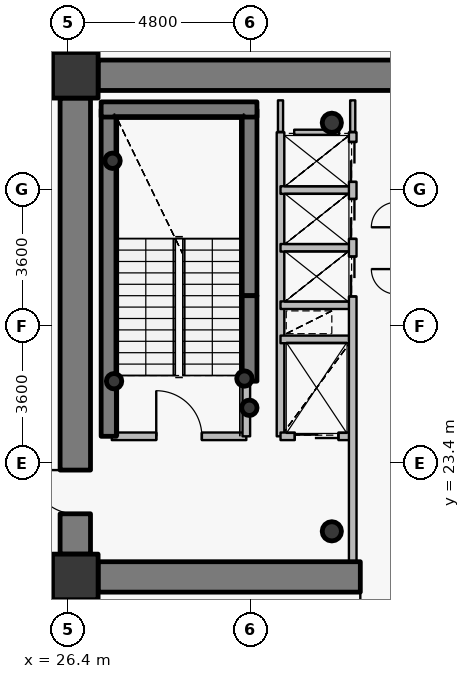
"""IFC4 building model, lengths in metres.
Left out: names, types, materials, properties, quantities, classifications, styles, units other than length and angle.
Written with IfcOpenShell. Run it as: python <this file> out.ifc"""

import sys

from ifc_helpers import new_model, si_unit, direction, frame, frame_2d, origin, origin_2d, place, context, subcontext, project, spatial, rectangle, hollow_circle, extrude, source, transform, mapped, element, fill, save


model = new_model("IFC4")
c1 = context("Model", 3, precision=1e-05, world=origin(), true_north=direction((0.0, 1.0)))
c2 = subcontext(c1, "Body", "Model", "MODEL_VIEW")
j1 = project(units=[si_unit("LENGTHUNIT", "METRE"), si_unit("PLANEANGLEUNIT", "RADIAN")], contexts=[c1])
p1 = place(None, origin())
s1 = spatial("IfcSite", under=j1, at=p1, CompositionType="ELEMENT")
p2 = place(p1, origin())
s2 = spatial("IfcBuilding", under=s1, at=p2, CompositionType="ELEMENT")
p3 = place(p2, frame((0.0, 0.0, 189.9)))
s3 = spatial("IfcBuildingStorey", under=s2, at=p3, CompositionType="ELEMENT", Elevation=189.9)
for number, where, z_axis, x_axis in (
    (1, (26.6, 20.4, 0.0), (0.0, 0.0, 1.0), (1.0, 0.0, 0.0)),
    (2, (26.6, 33.6, 0.0), (0.0, 0.0, 1.0), (1.0, 0.0, 0.0)),
):
    element("IfcColumn", number, at=place(p3, frame(where, z_axis=z_axis, x_axis=x_axis)), inside=s3, PredefinedType="COLUMN", context=c2, shape_type="SweptSolid", body=[
        extrude(rectangle(XDim=1.2, YDim=1.2, at=origin_2d()), origin(), (0.0, 0.0, 1.0), 3.75),
    ])
for number, where, z_axis, x_axis in (
    (3, (33.35, 21.6, 0.0), (0.0, 0.0, 1.0), (1.0, 0.0, 0.0)),
    (4, (33.35, 32.35, 0.0), (0.0, 0.0, 1.0), (1.0, 0.0, 0.0)),
):
    element("IfcColumn", number, at=place(p3, frame(where, z_axis=z_axis, x_axis=x_axis)), inside=s3, PredefinedType="COLUMN", context=c2, shape_type="SweptSolid", body=[
        extrude(hollow_circle(Radius=0.254, WallThickness=0.02, at=origin_2d()), origin(), (0.0, 0.0, 1.0), 3.75),
    ])
p4 = place(p3, frame((27.48, 24.1, 0.0), z_axis=(0.0, 0.0, 1.0), x_axis=(0.0, 1.0, 0.0)))
e5 = element("IfcWall", 5, at=p4, inside=s3, PredefinedType="SHEAR", context=c2, shape_type="SweptSolid", body=[
    extrude(rectangle(XDim=8.6, YDim=0.4, at=frame_2d((4.3, 0.0))), origin(), (0.0, 0.0, 1.0), 3.75),
])
p5 = place(p3, frame((31.18, 27.8, 0.0), z_axis=(0.0, 0.0, 1.0), x_axis=(0.0, 1.0, 0.0)))
e6 = element("IfcWall", 6, at=p5, inside=s3, PredefinedType="SHEAR", context=c2, shape_type="SweptSolid", body=[
    extrude(rectangle(XDim=4.9, YDim=0.4, at=frame_2d((2.45, 0.0))), origin(), (0.0, 0.0, 1.0), 3.75),
])
p6 = place(p3, frame((27.28, 32.7, 0.0), z_axis=(0.0, 0.0, 1.0), x_axis=(1.0, 0.0, 0.0)))
e7 = element("IfcWall", 7, at=p6, inside=s3, PredefinedType="SHEAR", context=c2, shape_type="SweptSolid", body=[
    extrude(rectangle(XDim=4.1, YDim=0.4, at=frame_2d((2.05, 0.0))), origin(), (0.0, 0.0, 1.0), 3.75),
])
for number, where, z_axis, x_axis in (
    (8, (27.58, 31.35, 0.0), (0.0, 0.0, 1.0), (1.0, 0.0, 0.0)),
    (9, (31.05, 25.62, 0.0), (0.0, 0.0, 1.0), (1.0, 0.0, 0.0)),
    (10, (31.18, 24.85, 0.0), (0.0, 0.0, 1.0), (1.0, 0.0, 0.0)),
    (11, (27.62, 25.55, 0.0), (0.0, 0.0, 1.0), (1.0, 0.0, 0.0)),
):
    element("IfcColumn", number, at=place(p3, frame(where, z_axis=z_axis, x_axis=x_axis)), inside=s3, PredefinedType="COLUMN", context=c2, shape_type="SweptSolid", body=[
        extrude(hollow_circle(Radius=0.203, WallThickness=0.016, at=origin_2d()), origin(), (0.0, 0.0, 1.0), 3.75),
    ])
p7 = place(p3, frame((27.2, 33.6, 0.0), z_axis=(0.0, 0.0, 1.0), x_axis=(1.0, 0.0, 0.0)))
e12 = element("IfcWall", 12, at=p7, inside=s3, PredefinedType="SHEAR", context=c2, shape_type="SweptSolid", body=[
    extrude(rectangle(XDim=17.6, YDim=0.8, at=frame_2d((8.8, 0.0))), origin(), (0.0, 0.0, 1.0), 2.95),
])
p8 = place(p7, frame((13.45, 0.0, 0.0)))
e13 = element("IfcOpeningElement", 13, at=p8, cuts=e12, PredefinedType="OPENING", context=c2, shape_type="SweptSolid", body=[
    extrude(rectangle(XDim=1.15, YDim=2.15, at=origin_2d()), frame((0.575, 0.41, 1.075), z_axis=(0.0, -1.0, 0.0), x_axis=(1.0, 0.0, 0.0)), (0.0, 0.0, 1.0), 0.82),
])
p9 = place(p3, frame((44.8, 20.4, 0.0), z_axis=(0.0, 0.0, 1.0), x_axis=(-1.0, 0.0, 0.0)))
e14 = element("IfcWall", 14, at=p9, inside=s3, PredefinedType="SHEAR", context=c2, shape_type="SweptSolid", body=[
    extrude(rectangle(XDim=17.6, YDim=0.8, at=frame_2d((8.8, 0.0))), origin(), (0.0, 0.0, 1.0), 2.95),
])
p10 = place(p9, frame((9.55, 0.0, 0.0)))
e15 = element("IfcOpeningElement", 15, at=p10, cuts=e14, PredefinedType="OPENING", context=c2, shape_type="SweptSolid", body=[
    extrude(rectangle(XDim=1.15, YDim=2.15, at=origin_2d()), frame((0.575, 0.41, 1.075), z_axis=(0.0, -1.0, 0.0), x_axis=(1.0, 0.0, 0.0)), (0.0, 0.0, 1.0), 0.82),
])
p11 = place(p3, frame((26.6, 21.0, 0.0), z_axis=(0.0, 0.0, 1.0), x_axis=(0.0, 1.0, 0.0)))
e16 = element("IfcWall", 16, at=p11, inside=s3, PredefinedType="SHEAR", context=c2, shape_type="SweptSolid", body=[
    extrude(rectangle(XDim=12.0, YDim=0.8, at=frame_2d((6.0, 0.0))), origin(), (0.0, 0.0, 1.0), 2.95),
])
p12 = place(p11, frame((1.061, 0.0, 0.0)))
e17 = element("IfcOpeningElement", 17, at=p12, cuts=e16, PredefinedType="OPENING", context=c2, shape_type="SweptSolid", body=[
    extrude(rectangle(XDim=1.15, YDim=2.15, at=origin_2d()), frame((0.575, 0.41, 1.075), z_axis=(0.0, -1.0, 0.0), x_axis=(1.0, 0.0, 0.0)), (0.0, 0.0, 1.0), 0.82),
])
p13 = place(p3, frame((31.18, 25.55, 0.0), z_axis=(0.0, 0.0, 1.0), x_axis=(0.0, 1.0, 0.0)))
e18 = element("IfcWall", 18, at=p13, inside=s3, PredefinedType="SHEAR", context=c2, shape_type="SweptSolid", body=[
    extrude(rectangle(XDim=2.25, YDim=0.4, at=frame_2d((1.125, 0.0))), origin(), (0.0, 0.0, 1.0), 3.1),
])
p14 = place(p3, frame((27.56, 24.1, 0.0), z_axis=(0.0, 0.0, 1.0), x_axis=(1.0, 0.0, 0.0)))
e19 = element("IfcWall", 19, at=p14, inside=s3, PredefinedType="PARTITIONING", context=c2, shape_type="SweptSolid", body=[
    extrude(rectangle(XDim=3.54, YDim=0.2, at=frame_2d((1.77, 0.0))), origin(), (0.0, 0.0, 1.0), 3.5),
])
p15 = place(p14, frame((1.17, 0.0, 0.0)))
e20 = element("IfcOpeningElement", 20, at=p15, cuts=e19, PredefinedType="OPENING", context=c2, shape_type="SweptSolid", body=[
    extrude(rectangle(XDim=1.2, YDim=2.15, at=origin_2d()), frame((0.6, 0.11, 1.075), z_axis=(0.0, -1.0, 0.0), x_axis=(1.0, 0.0, 0.0)), (0.0, 0.0, 1.0), 0.22),
])
p16 = place(p3, frame((31.1, 24.1, 0.0), z_axis=(0.0, 0.0, 1.0), x_axis=(0.0, 1.0, 0.0)))
e21 = element("IfcWall", 21, at=p16, inside=s3, PredefinedType="PARTITIONING", context=c2, shape_type="SweptSolid", body=[
    extrude(rectangle(XDim=1.44, YDim=0.2, at=frame_2d((0.72, 0.0))), origin(), (0.0, 0.0, 1.0), 3.5),
])
p17 = place(p3, frame((32.0, 24.1, 0.0), z_axis=(0.0, 0.0, 1.0), x_axis=(0.0, 1.0, 0.0)))
e22 = element("IfcWall", 22, at=p17, inside=s3, PredefinedType="PARTITIONING", context=c2, shape_type="SweptSolid", body=[
    extrude(rectangle(XDim=8.0, YDim=0.2, at=frame_2d((4.0, 0.0))), origin(), (0.0, 0.0, 1.0), 3.5),
])
p18 = place(p3, frame((32.0, 24.1, 0.0), z_axis=(0.0, 0.0, 1.0), x_axis=(1.0, 0.0, 0.0)))
e23 = element("IfcWall", 23, at=p18, inside=s3, PredefinedType="PARTITIONING", context=c2, shape_type="SweptSolid", body=[
    extrude(rectangle(XDim=1.9, YDim=0.2, at=frame_2d((0.95, 0.0))), origin(), (0.0, 0.0, 1.0), 3.085),
])
p19 = place(p18, frame((0.375, 0.0, 0.0)))
e24 = element("IfcOpeningElement", 24, at=p19, cuts=e23, PredefinedType="OPENING", context=c2, shape_type="SweptSolid", body=[
    extrude(rectangle(XDim=1.15, YDim=2.15, at=origin_2d()), frame((0.575, 0.11, 1.075), z_axis=(0.0, -1.0, 0.0), x_axis=(1.0, 0.0, 0.0)), (0.0, 0.0, 1.0), 0.22),
])
for number, where, z_axis, x_axis in (
    (25, (32.0, 26.65, 0.0), (0.0, 0.0, 1.0), (1.0, 0.0, 0.0)),
    (26, (32.0, 27.55, 0.0), (0.0, 0.0, 1.0), (1.0, 0.0, 0.0)),
    (27, (32.0, 29.06, 0.0), (0.0, 0.0, 1.0), (1.0, 0.0, 0.0)),
    (28, (32.0, 30.58, 0.0), (0.0, 0.0, 1.0), (1.0, 0.0, 0.0)),
):
    element("IfcWall", number, at=place(p3, frame(where, z_axis=z_axis, x_axis=x_axis)), inside=s3, PredefinedType="PARTITIONING", context=c2, shape_type="SweptSolid", body=[
        extrude(rectangle(XDim=1.9, YDim=0.2, at=frame_2d((0.95, 0.0))), origin(), (0.0, 0.0, 1.0), 3.085),
    ])
p20 = place(p3, frame((33.9, 20.8, 0.0), z_axis=(0.0, 0.0, 1.0), x_axis=(0.0, 1.0, 0.0)))
e29 = element("IfcWall", 29, at=p20, inside=s3, PredefinedType="PARTITIONING", context=c2, shape_type="SweptSolid", body=[
    extrude(rectangle(XDim=11.3, YDim=0.2, at=frame_2d((5.65, 0.0))), origin(), (0.0, 0.0, 1.0), 3.085),
])
p21 = place(p20, frame((6.98, 0.0, 0.0)))
e30 = element("IfcOpeningElement", 30, at=p21, cuts=e29, PredefinedType="OPENING", context=c2, shape_type="SweptSolid", body=[
    extrude(rectangle(XDim=1.05, YDim=2.15, at=origin_2d()), frame((0.525, 0.11, 1.075), z_axis=(0.0, -1.0, 0.0), x_axis=(1.0, 0.0, 0.0)), (0.0, 0.0, 1.0), 0.22),
])
p22 = place(p20, frame((8.495, 0.0, 0.0)))
e31 = element("IfcOpeningElement", 31, at=p22, cuts=e29, PredefinedType="OPENING", context=c2, shape_type="SweptSolid", body=[
    extrude(rectangle(XDim=1.05, YDim=2.15, at=origin_2d()), frame((0.525, 0.11, 1.075), z_axis=(0.0, -1.0, 0.0), x_axis=(1.0, 0.0, 0.0)), (0.0, 0.0, 1.0), 0.22),
])
p23 = place(p20, frame((9.995, 0.0, 0.0)))
e32 = element("IfcOpeningElement", 32, at=p23, cuts=e29, PredefinedType="OPENING", context=c2, shape_type="SweptSolid", body=[
    extrude(rectangle(XDim=1.05, YDim=2.15, at=origin_2d()), frame((0.525, 0.11, 1.075), z_axis=(0.0, -1.0, 0.0), x_axis=(1.0, 0.0, 0.0)), (0.0, 0.0, 1.0), 0.22),
])
p24 = place(p3, frame((32.36, 32.1, 0.0), z_axis=(0.0, 0.0, 1.0), x_axis=(1.0, 0.0, 0.0)))
e33 = element("IfcWall", 33, at=p24, inside=s3, PredefinedType="PARTITIONING", context=c2, shape_type="SweptSolid", body=[
    extrude(rectangle(XDim=1.18, YDim=0.135, at=frame_2d((0.59, 0.0))), origin(), (0.0, 0.0, 1.0), 3.085),
])
p25 = place(p3, frame((32.0, 32.94, 0.0), z_axis=(0.0, 0.0, 1.0), x_axis=(0.0, -1.0, 0.0)))
e34 = element("IfcWall", 34, at=p25, inside=s3, PredefinedType="PARTITIONING", context=c2, shape_type="SweptSolid", body=[
    extrude(rectangle(XDim=0.83, YDim=0.135, at=frame_2d((0.415, 0.0))), origin(), (0.0, 0.0, 1.0), 3.035),
])
p26 = place(p3, frame((33.9, 32.11, 0.0), z_axis=(0.0, 0.0, 1.0), x_axis=(0.0, 1.0, 0.0)))
e35 = element("IfcWall", 35, at=p26, inside=s3, PredefinedType="PARTITIONING", context=c2, shape_type="SweptSolid", body=[
    extrude(rectangle(XDim=0.83, YDim=0.135, at=frame_2d((0.415, 0.0))), origin(), (0.0, 0.0, 1.0), 3.085),
])
p27 = place(p3, frame((27.19, 34.0, 0.0), z_axis=(0.0, 0.0, 1.0), x_axis=(-1.0, 0.0, 0.0)))
e36 = element("IfcWall", 36, at=p27, inside=s3, PredefinedType="PARTITIONING", context=c2, shape_type="SweptSolid", body=[
    extrude(rectangle(XDim=0.99, YDim=0.135, at=frame_2d((0.495, 0.0))), origin(), (0.0, 0.0, 1.0), 2.935),
])
p28 = place(p3, frame((26.2, 33.692, 0.0), z_axis=(0.0, 0.0, 1.0), x_axis=(0.0, -1.0, 0.0)))
e37 = element("IfcWall", 37, at=p28, inside=s3, PredefinedType="PARTITIONING", context=c2, shape_type="SweptSolid", body=[
    extrude(rectangle(XDim=0.682, YDim=0.135, at=frame_2d((0.341, 0.0))), origin(), (0.0, 0.0, 1.0), 3.5),
])
p29 = place(p3, frame((26.2, 20.99, 0.0), z_axis=(0.0, 0.0, 1.0), x_axis=(0.0, -1.0, 0.0)))
e38 = element("IfcWall", 38, at=p29, inside=s3, PredefinedType="PARTITIONING", context=c2, shape_type="SweptSolid", body=[
    extrude(rectangle(XDim=0.99, YDim=0.135, at=frame_2d((0.495, 0.0))), origin(), (0.0, 0.0, 1.0), 3.5),
])
p30 = place(p3, frame((26.508, 20.0, 0.0), z_axis=(0.0, 0.0, 1.0), x_axis=(1.0, 0.0, 0.0)))
e39 = element("IfcWall", 39, at=p30, inside=s3, PredefinedType="PARTITIONING", context=c2, shape_type="SweptSolid", body=[
    extrude(rectangle(XDim=0.682, YDim=0.135, at=frame_2d((0.341, 0.0))), origin(), (0.0, 0.0, 1.0), 2.935),
])
m1 = source(origin(), c2, "Body", "SweptSolid", [
    extrude(rectangle(XDim=1.15, YDim=2.15, at=origin_2d()), frame((0.575, 0.025, 1.075), z_axis=(0.0, -1.0, 0.0), x_axis=(1.0, 0.0, 0.0)), (0.0, 0.0, 1.0), 0.05),
])
p31 = place(p12, origin())
e40 = element("IfcDoor", 40, at=p31, inside=s3, OperationType="SINGLE_SWING_RIGHT", PredefinedType="DOOR", context=c2, shape_type="MappedRepresentation", body=[
    mapped(m1, transform((0.0, 0.0, 0.0), x_axis=(1.0, 0.0, 0.0), y_axis=(0.0, 1.0, 0.0), z_axis=(0.0, 0.0, 1.0), scale=1.0)),
])
fill(e17, e40)
p32 = place(p10, origin())
e41 = element("IfcDoor", 41, at=p32, inside=s3, OperationType="SINGLE_SWING_RIGHT", PredefinedType="DOOR", context=c2, shape_type="MappedRepresentation", body=[
    mapped(m1, transform((0.0, 0.0, 0.0), x_axis=(1.0, 0.0, 0.0), y_axis=(0.0, 1.0, 0.0), z_axis=(0.0, 0.0, 1.0), scale=1.0)),
])
fill(e15, e41)
m2 = source(origin(), c2, "Body", "SweptSolid", [
    extrude(rectangle(XDim=1.2, YDim=2.15, at=origin_2d()), frame((0.6, 0.025, 1.075), z_axis=(0.0, -1.0, 0.0), x_axis=(1.0, 0.0, 0.0)), (0.0, 0.0, 1.0), 0.05),
])
p33 = place(p15, origin())
e42 = element("IfcDoor", 42, at=p33, inside=s3, OperationType="SINGLE_SWING_LEFT", PredefinedType="DOOR", context=c2, shape_type="MappedRepresentation", body=[
    mapped(m2, transform((0.0, 0.0, 0.0), x_axis=(1.0, 0.0, 0.0), y_axis=(0.0, 1.0, 0.0), z_axis=(0.0, 0.0, 1.0), scale=1.0)),
])
fill(e20, e42)
m3 = source(origin(), c2, "Body", "SweptSolid", [
    extrude(rectangle(XDim=1.15, YDim=2.15, at=origin_2d()), frame((0.575, 0.025, 1.075), z_axis=(0.0, -1.0, 0.0), x_axis=(1.0, 0.0, 0.0)), (0.0, 0.0, 1.0), 0.05),
])
p34 = place(p19, origin())
e43 = element("IfcDoor", 43, at=p34, inside=s3, OperationType="DOUBLE_DOOR_SLIDING", PredefinedType="USERDEFINED", context=c2, shape_type="MappedRepresentation", body=[
    mapped(m3, transform((0.0, 0.0, 0.0), x_axis=(1.0, 0.0, 0.0), y_axis=(0.0, 1.0, 0.0), z_axis=(0.0, 0.0, 1.0), scale=1.0)),
])
fill(e24, e43)
m4 = source(origin(), c2, "Body", "SweptSolid", [
    extrude(rectangle(XDim=1.05, YDim=2.15, at=origin_2d()), frame((0.525, 0.025, 1.075), z_axis=(0.0, -1.0, 0.0), x_axis=(1.0, 0.0, 0.0)), (0.0, 0.0, 1.0), 0.05),
])
p35 = place(p21, origin())
e44 = element("IfcDoor", 44, at=p35, inside=s3, OperationType="DOUBLE_DOOR_SLIDING", PredefinedType="USERDEFINED", context=c2, shape_type="MappedRepresentation", body=[
    mapped(m4, transform((0.0, 0.0, 0.0), x_axis=(1.0, 0.0, 0.0), y_axis=(0.0, 1.0, 0.0), z_axis=(0.0, 0.0, 1.0), scale=1.0)),
])
fill(e30, e44)
p36 = place(p22, origin())
e45 = element("IfcDoor", 45, at=p36, inside=s3, OperationType="DOUBLE_DOOR_SLIDING", PredefinedType="USERDEFINED", context=c2, shape_type="MappedRepresentation", body=[
    mapped(m4, transform((0.0, 0.0, 0.0), x_axis=(1.0, 0.0, 0.0), y_axis=(0.0, 1.0, 0.0), z_axis=(0.0, 0.0, 1.0), scale=1.0)),
])
fill(e31, e45)
p37 = place(p23, origin())
e46 = element("IfcDoor", 46, at=p37, inside=s3, OperationType="DOUBLE_DOOR_SLIDING", PredefinedType="USERDEFINED", context=c2, shape_type="MappedRepresentation", body=[
    mapped(m4, transform((0.0, 0.0, 0.0), x_axis=(1.0, 0.0, 0.0), y_axis=(0.0, 1.0, 0.0), z_axis=(0.0, 0.0, 1.0), scale=1.0)),
])
fill(e32, e46)
save(model, sys.argv[1])
